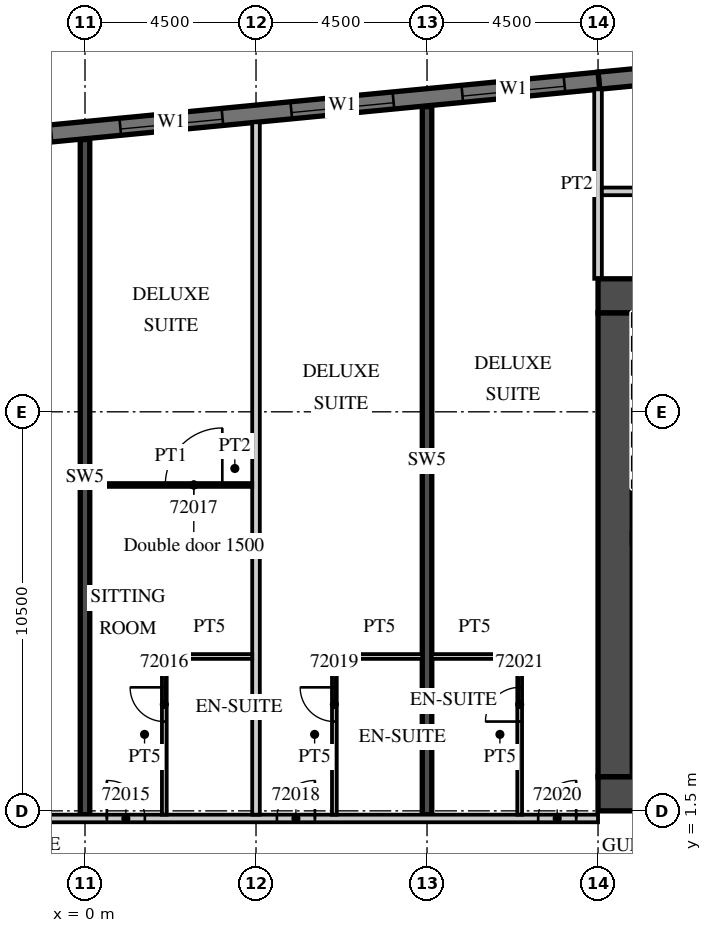
"""IFC4 building model, lengths in metres.
Left out: names, types, materials, properties, quantities, classifications, styles, units other than length and angle.
Written with IfcOpenShell. Run it as: python <this file> out.ifc"""

import sys

from ifc_helpers import new_model, si_unit, direction, frame, frame_2d, origin, place, context, subcontext, project, spatial, rectangle, extrude, element, fill, save


model = new_model("IFC4")
c1 = context("Model", 3, precision=1e-05, world=origin(), true_north=direction((0.0, 1.0)))
c2 = subcontext(c1, "Body", "Model", "MODEL_VIEW")
j1 = project(units=[si_unit("LENGTHUNIT", "METRE"), si_unit("PLANEANGLEUNIT", "RADIAN")], contexts=[c1])
p1 = place(None, origin())
s1 = spatial("IfcSite", under=j1, at=p1, CompositionType="ELEMENT")
p2 = place(p1, origin())
s2 = spatial("IfcBuilding", under=s1, at=p2, CompositionType="ELEMENT")
p3 = place(p2, frame((0.0, 0.0, 288.3)))
s3 = spatial("IfcBuildingStorey", under=s2, at=p3, CompositionType="ELEMENT", Elevation=288.3)
p4 = place(p3, frame((0.0, 1.4, 0.0), z_axis=(0.0, 0.0, 1.0), x_axis=(0.0, 1.0, 0.0)))
e1 = element("IfcWall", 1, at=p4, inside=s3, PredefinedType="SHEAR", context=c2, shape_type="SweptSolid", body=[
    extrude(rectangle(XDim=17.763, YDim=0.25, at=frame_2d((8.881, 0.0))), origin(), (0.0, 0.0, 1.0), 3.3),
])
p5 = place(p3, frame((9.0, 1.4, 0.0), z_axis=(0.0, 0.0, 1.0), x_axis=(0.0, 1.0, 0.0)))
e2 = element("IfcWall", 2, at=p5, inside=s3, PredefinedType="SHEAR", context=c2, shape_type="SweptSolid", body=[
    extrude(rectangle(XDim=18.629, YDim=0.25, at=frame_2d((9.315, 0.0))), origin(), (0.0, 0.0, 1.0), 3.3),
])
p6 = place(p3, frame((30.946, 22.391, 0.0), z_axis=(0.0, 0.0, 1.0), x_axis=(-0.995396397117, -0.095843688398, 0.0)))
e3 = element("IfcWall", 3, at=p6, inside=s3, PredefinedType="SOLIDWALL", context=c2, shape_type="SweptSolid", body=[
    extrude(rectangle(XDim=17.505, YDim=0.45, at=frame_2d((8.752, 0.0))), origin(), (0.0, 0.0, 1.0), 3.02),
])
p7 = place(p3, frame((13.521, 20.713, 0.0), z_axis=(0.0, 0.0, 1.0), x_axis=(-0.995396277313, -0.095844932638, 0.0)))
e4 = element("IfcWall", 4, at=p7, inside=s3, PredefinedType="SOLIDWALL", context=c2, shape_type="SweptSolid", body=[
    extrude(rectangle(XDim=51.495, YDim=0.45, at=frame_2d((25.748, 0.0))), origin(), (0.0, 0.0, 1.0), 3.02),
])
p8 = place(p7, frame((0.91, 0.0, 0.45)))
e5 = element("IfcOpeningElement", 5, at=p8, cuts=e4, PredefinedType="OPENING", context=c2, shape_type="SweptSolid", body=[
    extrude(rectangle(XDim=2.7, YDim=2.25, at=frame_2d((1.35, 1.125))), frame((0.0, 0.235, 0.0), z_axis=(0.0, -1.0, 0.0), x_axis=(1.0, 0.0, 0.0)), (0.0, 0.0, 1.0), 0.47),
])
p9 = place(p7, frame((5.431, 0.0, 0.45)))
e6 = element("IfcOpeningElement", 6, at=p9, cuts=e4, PredefinedType="OPENING", context=c2, shape_type="SweptSolid", body=[
    extrude(rectangle(XDim=2.7, YDim=2.25, at=frame_2d((1.35, 1.125))), frame((0.0, 0.235, 0.0), z_axis=(0.0, -1.0, 0.0), x_axis=(1.0, 0.0, 0.0)), (0.0, 0.0, 1.0), 0.47),
])
p10 = place(p7, frame((9.952, 0.0, 0.45)))
e7 = element("IfcOpeningElement", 7, at=p10, cuts=e4, PredefinedType="OPENING", context=c2, shape_type="SweptSolid", body=[
    extrude(rectangle(XDim=2.7, YDim=2.25, at=frame_2d((1.35, 1.125))), frame((0.0, 0.235, 0.0), z_axis=(0.0, -1.0, 0.0), x_axis=(1.0, 0.0, 0.0)), (0.0, 0.0, 1.0), 0.47),
])
p11 = place(p7, frame((14.473, 0.0, 0.45)))
e8 = element("IfcOpeningElement", 8, at=p11, cuts=e4, PredefinedType="OPENING", context=c2, shape_type="SweptSolid", body=[
    extrude(rectangle(XDim=2.7, YDim=2.25, at=frame_2d((1.35, 1.125))), frame((0.0, 0.235, 0.0), z_axis=(0.0, -1.0, 0.0), x_axis=(1.0, 0.0, 0.0)), (0.0, 0.0, 1.0), 0.47),
])
p12 = place(p7, frame((18.994, 0.0, 0.45)))
e9 = element("IfcOpeningElement", 9, at=p12, cuts=e4, PredefinedType="OPENING", context=c2, shape_type="SweptSolid", body=[
    extrude(rectangle(XDim=2.7, YDim=2.25, at=frame_2d((1.35, 1.125))), frame((0.0, 0.235, 0.0), z_axis=(0.0, -1.0, 0.0), x_axis=(1.0, 0.0, 0.0)), (0.0, 0.0, 1.0), 0.47),
])
p13 = place(p7, frame((23.514, 0.0, 0.45)))
e10 = element("IfcOpeningElement", 10, at=p13, cuts=e4, PredefinedType="OPENING", context=c2, shape_type="SweptSolid", body=[
    extrude(rectangle(XDim=2.7, YDim=2.25, at=frame_2d((1.35, 1.125))), frame((0.0, 0.235, 0.0), z_axis=(0.0, -1.0, 0.0), x_axis=(1.0, 0.0, 0.0)), (0.0, 0.0, 1.0), 0.47),
])
p14 = place(p7, frame((28.035, 0.0, 0.45)))
e11 = element("IfcOpeningElement", 11, at=p14, cuts=e4, PredefinedType="OPENING", context=c2, shape_type="SweptSolid", body=[
    extrude(rectangle(XDim=2.7, YDim=2.25, at=frame_2d((1.35, 1.125))), frame((0.0, 0.235, 0.0), z_axis=(0.0, -1.0, 0.0), x_axis=(1.0, 0.0, 0.0)), (0.0, 0.0, 1.0), 0.47),
])
p15 = place(p7, frame((32.556, 0.0, 0.45)))
e12 = element("IfcOpeningElement", 12, at=p15, cuts=e4, PredefinedType="OPENING", context=c2, shape_type="SweptSolid", body=[
    extrude(rectangle(XDim=2.7, YDim=2.25, at=frame_2d((1.35, 1.125))), frame((0.0, 0.235, 0.0), z_axis=(0.0, -1.0, 0.0), x_axis=(1.0, 0.0, 0.0)), (0.0, 0.0, 1.0), 0.47),
])
p16 = place(p7, frame((37.077, 0.0, 0.45)))
e13 = element("IfcOpeningElement", 13, at=p16, cuts=e4, PredefinedType="OPENING", context=c2, shape_type="SweptSolid", body=[
    extrude(rectangle(XDim=2.7, YDim=2.25, at=frame_2d((1.35, 1.125))), frame((0.0, 0.235, 0.0), z_axis=(0.0, -1.0, 0.0), x_axis=(1.0, 0.0, 0.0)), (0.0, 0.0, 1.0), 0.47),
])
p17 = place(p7, frame((41.598, 0.0, 0.45)))
e14 = element("IfcOpeningElement", 14, at=p17, cuts=e4, PredefinedType="OPENING", context=c2, shape_type="SweptSolid", body=[
    extrude(rectangle(XDim=2.7, YDim=2.25, at=frame_2d((1.35, 1.125))), frame((0.0, 0.235, 0.0), z_axis=(0.0, -1.0, 0.0), x_axis=(1.0, 0.0, 0.0)), (0.0, 0.0, 1.0), 0.47),
])
p18 = place(p7, frame((46.118, 0.0, 0.45)))
e15 = element("IfcOpeningElement", 15, at=p18, cuts=e4, PredefinedType="OPENING", context=c2, shape_type="SweptSolid", body=[
    extrude(rectangle(XDim=2.7, YDim=2.25, at=frame_2d((1.35, 1.125))), frame((0.0, 0.235, 0.0), z_axis=(0.0, -1.0, 0.0), x_axis=(1.0, 0.0, 0.0)), (0.0, 0.0, 1.0), 0.47),
])
p19 = place(p3, frame((13.5, 15.5, 0.0), z_axis=(0.0, 0.0, 1.0), x_axis=(0.0, 1.0, 0.0)))
e16 = element("IfcWall", 16, at=p19, inside=s3, PredefinedType="PARTITIONING", context=c2, shape_type="SweptSolid", body=[
    extrude(rectangle(XDim=4.985, YDim=0.2, at=frame_2d((2.493, 0.0))), origin(), (0.0, 0.0, 1.0), 3.02),
])
p20 = place(p3, frame((-39.909, 1.3, 0.0), z_axis=(0.0, 0.0, 1.0), x_axis=(1.0, 0.0, 0.0)))
e17 = element("IfcWall", 17, at=p20, inside=s3, PredefinedType="PARTITIONING", context=c2, shape_type="SweptSolid", body=[
    extrude(rectangle(XDim=53.409, YDim=0.2, at=frame_2d((26.705, 0.0))), origin(), (0.0, 0.0, 1.0), 3.02),
])
p21 = place(p20, frame((0.255, 0.0, 0.0)))
e18 = element("IfcOpeningElement", 18, at=p21, cuts=e17, PredefinedType="OPENING", context=c2, shape_type="SweptSolid", body=[
    extrude(rectangle(XDim=0.9, YDim=2.1, at=frame_2d((0.45, 1.05))), frame((0.0, 0.11, 0.0), z_axis=(0.0, -1.0, 0.0), x_axis=(1.0, 0.0, 0.0)), (0.0, 0.0, 1.0), 0.22),
])
p22 = place(p20, frame((6.347, 0.0, 0.0)))
e19 = element("IfcOpeningElement", 19, at=p22, cuts=e17, PredefinedType="OPENING", context=c2, shape_type="SweptSolid", body=[
    extrude(rectangle(XDim=1.2, YDim=2.1, at=frame_2d((0.6, 1.05))), frame((0.0, 0.11, 0.0), z_axis=(0.0, -1.0, 0.0), x_axis=(1.0, 0.0, 0.0)), (0.0, 0.0, 1.0), 0.22),
])
p23 = place(p20, frame((13.484, 0.0, 0.0)))
e20 = element("IfcOpeningElement", 20, at=p23, cuts=e17, PredefinedType="OPENING", context=c2, shape_type="SweptSolid", body=[
    extrude(rectangle(XDim=1.0, YDim=2.1, at=frame_2d((0.5, 1.05))), frame((0.0, 0.11, 0.0), z_axis=(0.0, -1.0, 0.0), x_axis=(1.0, 0.0, 0.0)), (0.0, 0.0, 1.0), 0.22),
])
p24 = place(p20, frame((20.334, 0.0, 0.0)))
e21 = element("IfcOpeningElement", 21, at=p24, cuts=e17, PredefinedType="OPENING", context=c2, shape_type="SweptSolid", body=[
    extrude(rectangle(XDim=1.0, YDim=2.1, at=frame_2d((0.5, 1.05))), frame((0.0, 0.11, 0.0), z_axis=(0.0, -1.0, 0.0), x_axis=(1.0, 0.0, 0.0)), (0.0, 0.0, 1.0), 0.22),
])
p25 = place(p20, frame((22.484, 0.0, 0.0)))
e22 = element("IfcOpeningElement", 22, at=p25, cuts=e17, PredefinedType="OPENING", context=c2, shape_type="SweptSolid", body=[
    extrude(rectangle(XDim=1.0, YDim=2.1, at=frame_2d((0.5, 1.05))), frame((0.0, 0.11, 0.0), z_axis=(0.0, -1.0, 0.0), x_axis=(1.0, 0.0, 0.0)), (0.0, 0.0, 1.0), 0.22),
])
p26 = place(p20, frame((26.959, 0.0, 0.0)))
e23 = element("IfcOpeningElement", 23, at=p26, cuts=e17, PredefinedType="OPENING", context=c2, shape_type="SweptSolid", body=[
    extrude(rectangle(XDim=1.0, YDim=2.1, at=frame_2d((0.5, 1.05))), frame((0.0, 0.11, 0.0), z_axis=(0.0, -1.0, 0.0), x_axis=(1.0, 0.0, 0.0)), (0.0, 0.0, 1.0), 0.22),
])
p27 = place(p20, frame((36.271, 0.0, 0.0)))
e24 = element("IfcOpeningElement", 24, at=p27, cuts=e17, PredefinedType="OPENING", context=c2, shape_type="SweptSolid", body=[
    extrude(rectangle(XDim=1.2, YDim=2.1, at=frame_2d((0.6, 1.05))), frame((0.0, 0.11, 0.0), z_axis=(0.0, -1.0, 0.0), x_axis=(1.0, 0.0, 0.0)), (0.0, 0.0, 1.0), 0.22),
])
p28 = place(p20, frame((40.484, 0.0, 0.0)))
e25 = element("IfcOpeningElement", 25, at=p28, cuts=e17, PredefinedType="OPENING", context=c2, shape_type="SweptSolid", body=[
    extrude(rectangle(XDim=1.0, YDim=2.1, at=frame_2d((0.5, 1.05))), frame((0.0, 0.11, 0.0), z_axis=(0.0, -1.0, 0.0), x_axis=(1.0, 0.0, 0.0)), (0.0, 0.0, 1.0), 0.22),
])
p29 = place(p20, frame((44.959, 0.0, 0.0)))
e26 = element("IfcOpeningElement", 26, at=p29, cuts=e17, PredefinedType="OPENING", context=c2, shape_type="SweptSolid", body=[
    extrude(rectangle(XDim=1.0, YDim=2.1, at=frame_2d((0.5, 1.05))), frame((0.0, 0.11, 0.0), z_axis=(0.0, -1.0, 0.0), x_axis=(1.0, 0.0, 0.0)), (0.0, 0.0, 1.0), 0.22),
])
p30 = place(p20, frame((51.834, 0.0, 0.0)))
e27 = element("IfcOpeningElement", 27, at=p30, cuts=e17, PredefinedType="OPENING", context=c2, shape_type="SweptSolid", body=[
    extrude(rectangle(XDim=1.0, YDim=2.1, at=frame_2d((0.5, 1.05))), frame((0.0, 0.11, 0.0), z_axis=(0.0, -1.0, 0.0), x_axis=(1.0, 0.0, 0.0)), (0.0, 0.0, 1.0), 0.22),
])
p31 = place(p3, frame((4.5, 1.4, 0.0), z_axis=(0.0, 0.0, 1.0), x_axis=(0.0, 1.0, 0.0)))
e28 = element("IfcWall", 28, at=p31, inside=s3, PredefinedType="PARTITIONING", context=c2, shape_type="SweptSolid", body=[
    extrude(rectangle(XDim=18.218, YDim=0.2, at=frame_2d((9.109, 0.0))), origin(), (0.0, 0.0, 1.0), 3.02),
])
p32 = place(p3, frame((2.087, 1.4, 0.0), z_axis=(0.0, 0.0, 1.0), x_axis=(0.0, 1.0, 0.0)))
e29 = element("IfcWall", 29, at=p32, inside=s3, PredefinedType="PARTITIONING", context=c2, shape_type="SweptSolid", body=[
    extrude(rectangle(XDim=4.225, YDim=0.125, at=frame_2d((2.113, 0.0))), origin(), (0.0, 0.0, 1.0), 3.02),
])
p33 = place(p32, frame((2.45, 0.0, 0.0)))
e30 = element("IfcOpeningElement", 30, at=p33, cuts=e29, PredefinedType="OPENING", context=c2, shape_type="SweptSolid", body=[
    extrude(rectangle(XDim=0.9, YDim=2.1, at=frame_2d((0.45, 1.05))), frame((0.0, 0.073, 0.0), z_axis=(0.0, -1.0, 0.0), x_axis=(1.0, 0.0, 0.0)), (0.0, 0.0, 1.0), 0.145),
])
p34 = place(p3, frame((2.15, 5.562, 0.0), z_axis=(0.0, 0.0, 1.0), x_axis=(1.0, 0.0, 0.0)))
e31 = element("IfcWall", 31, at=p34, inside=s3, PredefinedType="PARTITIONING", context=c2, shape_type="SweptSolid", body=[
    extrude(rectangle(XDim=2.25, YDim=0.125, at=frame_2d((1.125, 0.0))), origin(), (0.0, 0.0, 1.0), 3.02),
])
p35 = place(p3, frame((0.125, 10.075, 0.0), z_axis=(0.0, 0.0, 1.0), x_axis=(1.0, 0.0, 0.0)))
e32 = element("IfcWall", 32, at=p35, inside=s3, PredefinedType="PARTITIONING", context=c2, shape_type="SweptSolid", body=[
    extrude(rectangle(XDim=4.275, YDim=0.1, at=frame_2d((2.137, 0.0))), origin(), (0.0, 0.0, 1.0), 3.02),
])
p36 = place(p35, frame((1.988, 0.0, 0.0)))
e33 = element("IfcOpeningElement", 33, at=p36, cuts=e32, PredefinedType="OPENING", context=c2, shape_type="SweptSolid", body=[
    extrude(rectangle(XDim=1.5, YDim=2.1, at=frame_2d((0.75, 1.05))), frame((0.0, 0.06, 0.0), z_axis=(0.0, -1.0, 0.0), x_axis=(1.0, 0.0, 0.0)), (0.0, 0.0, 1.0), 0.12),
])
p37 = place(p3, frame((6.562, 1.4, 0.0), z_axis=(0.0, 0.0, 1.0), x_axis=(0.0, 1.0, 0.0)))
e34 = element("IfcWall", 34, at=p37, inside=s3, PredefinedType="PARTITIONING", context=c2, shape_type="SweptSolid", body=[
    extrude(rectangle(XDim=4.225, YDim=0.125, at=frame_2d((2.113, 0.0))), origin(), (0.0, 0.0, 1.0), 3.02),
])
p38 = place(p37, frame((2.45, 0.0, 0.0)))
e35 = element("IfcOpeningElement", 35, at=p38, cuts=e34, PredefinedType="OPENING", context=c2, shape_type="SweptSolid", body=[
    extrude(rectangle(XDim=0.9, YDim=2.1, at=frame_2d((0.45, 1.05))), frame((0.0, 0.073, 0.0), z_axis=(0.0, -1.0, 0.0), x_axis=(1.0, 0.0, 0.0)), (0.0, 0.0, 1.0), 0.145),
])
p39 = place(p3, frame((6.625, 5.562, 0.0), z_axis=(0.0, 0.0, 1.0), x_axis=(1.0, 0.0, 0.0)))
e36 = element("IfcWall", 36, at=p39, inside=s3, PredefinedType="PARTITIONING", context=c2, shape_type="SweptSolid", body=[
    extrude(rectangle(XDim=2.25, YDim=0.125, at=frame_2d((1.125, 0.0))), origin(), (0.0, 0.0, 1.0), 3.02),
])
p40 = place(p3, frame((11.438, 1.4, 0.0), z_axis=(0.0, 0.0, 1.0), x_axis=(0.0, 1.0, 0.0)))
e37 = element("IfcWall", 37, at=p40, inside=s3, PredefinedType="PARTITIONING", context=c2, shape_type="SweptSolid", body=[
    extrude(rectangle(XDim=4.225, YDim=0.125, at=frame_2d((2.113, 0.0))), origin(), (0.0, 0.0, 1.0), 3.02),
])
p41 = place(p40, frame((2.45, 0.0, 0.0)))
e38 = element("IfcOpeningElement", 38, at=p41, cuts=e37, PredefinedType="OPENING", context=c2, shape_type="SweptSolid", body=[
    extrude(rectangle(XDim=0.9, YDim=2.1, at=frame_2d((0.45, 1.05))), frame((0.0, 0.073, 0.0), z_axis=(0.0, -1.0, 0.0), x_axis=(1.0, 0.0, 0.0)), (0.0, 0.0, 1.0), 0.145),
])
p42 = place(p3, frame((9.125, 5.562, 0.0), z_axis=(0.0, 0.0, 1.0), x_axis=(1.0, 0.0, 0.0)))
e39 = element("IfcWall", 39, at=p42, inside=s3, PredefinedType="PARTITIONING", context=c2, shape_type="SweptSolid", body=[
    extrude(rectangle(XDim=2.25, YDim=0.125, at=frame_2d((1.125, 0.0))), origin(), (0.0, 0.0, 1.0), 3.02),
])
p43 = place(p3, frame((13.5, 1.95, 0.0), z_axis=(0.0, 0.0, 1.0), x_axis=(1.0, 0.0, 0.0)))
e40 = element("IfcWall", 40, at=p43, inside=s3, PredefinedType="SHEAR", context=c2, shape_type="SweptSolid", body=[
    extrude(rectangle(XDim=18.0, YDim=0.9, at=frame_2d((9.0, 0.0))), origin(), (0.0, 0.0, 1.0), 3.02),
])
p44 = place(p43, frame((1.475, 0.0, 0.0)))
e41 = element("IfcOpeningElement", 41, at=p44, cuts=e40, PredefinedType="OPENING", context=c2, shape_type="SweptSolid", body=[
    extrude(rectangle(XDim=1.8, YDim=2.1, at=frame_2d((0.9, 1.05))), frame((0.0, 0.46, 0.0), z_axis=(0.0, -1.0, 0.0), x_axis=(1.0, 0.0, 0.0)), (0.0, 0.0, 1.0), 0.92),
])
p45 = place(p3, frame((13.5, 15.05, 0.0), z_axis=(0.0, 0.0, 1.0), x_axis=(1.0, 0.0, 0.0)))
e42 = element("IfcWall", 42, at=p45, inside=s3, PredefinedType="SHEAR", context=c2, shape_type="SweptSolid", body=[
    extrude(rectangle(XDim=6.8, YDim=0.9, at=frame_2d((3.4, 0.0))), origin(), (0.0, 0.0, 1.0), 3.02),
])
p46 = place(p45, frame((4.725, 0.0, 0.0)))
e43 = element("IfcOpeningElement", 43, at=p46, cuts=e42, PredefinedType="OPENING", context=c2, shape_type="SweptSolid", body=[
    extrude(rectangle(XDim=1.2, YDim=2.1, at=frame_2d((0.6, 1.05))), frame((0.0, 0.46, 0.0), z_axis=(0.0, -1.0, 0.0), x_axis=(1.0, 0.0, 0.0)), (0.0, 0.0, 1.0), 0.92),
])
p47 = place(p3, frame((13.95, 2.4, 0.0), z_axis=(0.0, 0.0, 1.0), x_axis=(0.0, 1.0, 0.0)))
e44 = element("IfcWall", 44, at=p47, inside=s3, PredefinedType="SHEAR", context=c2, shape_type="SweptSolid", body=[
    extrude(rectangle(XDim=12.2, YDim=0.9, at=frame_2d((6.1, 0.0))), origin(), (0.0, 0.0, 1.0), 3.02),
])
p48 = place(p3, frame((13.6, 17.8, 0.0), z_axis=(0.0, 0.0, 1.0), x_axis=(1.0, 0.0, 0.0)))
e45 = element("IfcWall", 45, at=p48, inside=s3, PredefinedType="PARTITIONING", context=c2, shape_type="SweptSolid", body=[
    extrude(rectangle(XDim=21.354, YDim=0.2, at=frame_2d((10.677, 0.0))), origin(), (0.0, 0.0, 1.0), 3.02),
])
p49 = place(p48, frame((17.812, 0.0, 0.0)))
e46 = element("IfcOpeningElement", 46, at=p49, cuts=e45, PredefinedType="OPENING", context=c2, shape_type="SweptSolid", body=[
    extrude(rectangle(XDim=0.9, YDim=2.1, at=frame_2d((0.45, 1.05))), frame((0.0, 0.11, 0.0), z_axis=(0.0, -1.0, 0.0), x_axis=(1.0, 0.0, 0.0)), (0.0, 0.0, 1.0), 0.22),
])
p50 = place(p48, frame((9.512, 0.0, 0.0)))
e47 = element("IfcOpeningElement", 47, at=p50, cuts=e45, PredefinedType="OPENING", context=c2, shape_type="SweptSolid", body=[
    extrude(rectangle(XDim=0.9, YDim=2.1, at=frame_2d((0.45, 1.05))), frame((0.0, 0.11, 0.0), z_axis=(0.0, -1.0, 0.0), x_axis=(1.0, 0.0, 0.0)), (0.0, 0.0, 1.0), 0.22),
])
p51 = place(p8, origin())
e48 = element("IfcWindow", 48, at=p51, inside=s3, PartitioningType="SINGLE_PANEL", PredefinedType="WINDOW", context=c2, shape_type="SweptSolid", body=[
    extrude(rectangle(XDim=2.7, YDim=2.25, at=frame_2d((1.35, 1.125))), frame((0.0, 0.09, 0.0), z_axis=(0.0, -1.0, 0.0), x_axis=(1.0, 0.0, 0.0)), (0.0, 0.0, 1.0), 0.06),
])
fill(e5, e48)
p52 = place(p9, origin())
e49 = element("IfcWindow", 49, at=p52, inside=s3, PartitioningType="SINGLE_PANEL", PredefinedType="WINDOW", context=c2, shape_type="SweptSolid", body=[
    extrude(rectangle(XDim=2.7, YDim=2.25, at=frame_2d((1.35, 1.125))), frame((0.0, 0.09, 0.0), z_axis=(0.0, -1.0, 0.0), x_axis=(1.0, 0.0, 0.0)), (0.0, 0.0, 1.0), 0.06),
])
fill(e6, e49)
p53 = place(p10, origin())
e50 = element("IfcWindow", 50, at=p53, inside=s3, PartitioningType="SINGLE_PANEL", PredefinedType="WINDOW", context=c2, shape_type="SweptSolid", body=[
    extrude(rectangle(XDim=2.7, YDim=2.25, at=frame_2d((1.35, 1.125))), frame((0.0, 0.09, 0.0), z_axis=(0.0, -1.0, 0.0), x_axis=(1.0, 0.0, 0.0)), (0.0, 0.0, 1.0), 0.06),
])
fill(e7, e50)
p54 = place(p28, origin())
e51 = element("IfcDoor", 51, at=p54, inside=s3, OperationType="SINGLE_SWING_LEFT", PredefinedType="DOOR", context=c2, shape_type="SweptSolid", body=[
    extrude(rectangle(XDim=1.0, YDim=2.1, at=frame_2d((0.5, 1.05))), frame((0.0, 0.025, 0.0), z_axis=(0.0, -1.0, 0.0), x_axis=(1.0, 0.0, 0.0)), (0.0, 0.0, 1.0), 0.05),
])
fill(e25, e51)
p55 = place(p33, origin())
e52 = element("IfcDoor", 52, at=p55, inside=s3, OperationType="SINGLE_SWING_RIGHT", PredefinedType="DOOR", context=c2, shape_type="SweptSolid", body=[
    extrude(rectangle(XDim=0.9, YDim=2.1, at=frame_2d((0.45, 1.05))), frame((0.0, 0.025, 0.0), z_axis=(0.0, -1.0, 0.0), x_axis=(1.0, 0.0, 0.0)), (0.0, 0.0, 1.0), 0.05),
])
fill(e30, e52)
p56 = place(p36, origin())
e53 = element("IfcDoor", 53, at=p56, inside=s3, OperationType="SINGLE_SWING_RIGHT", PredefinedType="DOOR", context=c2, shape_type="SweptSolid", body=[
    extrude(rectangle(XDim=1.5, YDim=2.1, at=frame_2d((0.75, 1.05))), frame((0.0, 0.025, 0.0), z_axis=(0.0, -1.0, 0.0), x_axis=(1.0, 0.0, 0.0)), (0.0, 0.0, 1.0), 0.05),
])
fill(e33, e53)
p57 = place(p29, origin())
e54 = element("IfcDoor", 54, at=p57, inside=s3, OperationType="SINGLE_SWING_RIGHT", PredefinedType="DOOR", context=c2, shape_type="SweptSolid", body=[
    extrude(rectangle(XDim=1.0, YDim=2.1, at=frame_2d((0.5, 1.05))), frame((0.0, 0.025, 0.0), z_axis=(0.0, -1.0, 0.0), x_axis=(1.0, 0.0, 0.0)), (0.0, 0.0, 1.0), 0.05),
])
fill(e26, e54)
p58 = place(p38, origin())
e55 = element("IfcDoor", 55, at=p58, inside=s3, OperationType="SINGLE_SWING_RIGHT", PredefinedType="DOOR", context=c2, shape_type="SweptSolid", body=[
    extrude(rectangle(XDim=0.9, YDim=2.1, at=frame_2d((0.45, 1.05))), frame((0.0, 0.025, 0.0), z_axis=(0.0, -1.0, 0.0), x_axis=(1.0, 0.0, 0.0)), (0.0, 0.0, 1.0), 0.05),
])
fill(e35, e55)
p59 = place(p30, origin())
e56 = element("IfcDoor", 56, at=p59, inside=s3, OperationType="SINGLE_SWING_RIGHT", PredefinedType="DOOR", context=c2, shape_type="SweptSolid", body=[
    extrude(rectangle(XDim=1.0, YDim=2.1, at=frame_2d((0.5, 1.05))), frame((0.0, 0.025, 0.0), z_axis=(0.0, -1.0, 0.0), x_axis=(1.0, 0.0, 0.0)), (0.0, 0.0, 1.0), 0.05),
])
fill(e27, e56)
p60 = place(p41, origin())
e57 = element("IfcDoor", 57, at=p60, inside=s3, OperationType="SINGLE_SWING_LEFT", PredefinedType="DOOR", context=c2, shape_type="SweptSolid", body=[
    extrude(rectangle(XDim=0.9, YDim=2.1, at=frame_2d((0.45, 1.05))), frame((0.0, 0.025, 0.0), z_axis=(0.0, -1.0, 0.0), x_axis=(1.0, 0.0, 0.0)), (0.0, 0.0, 1.0), 0.05),
])
fill(e38, e57)
save(model, sys.argv[1])
